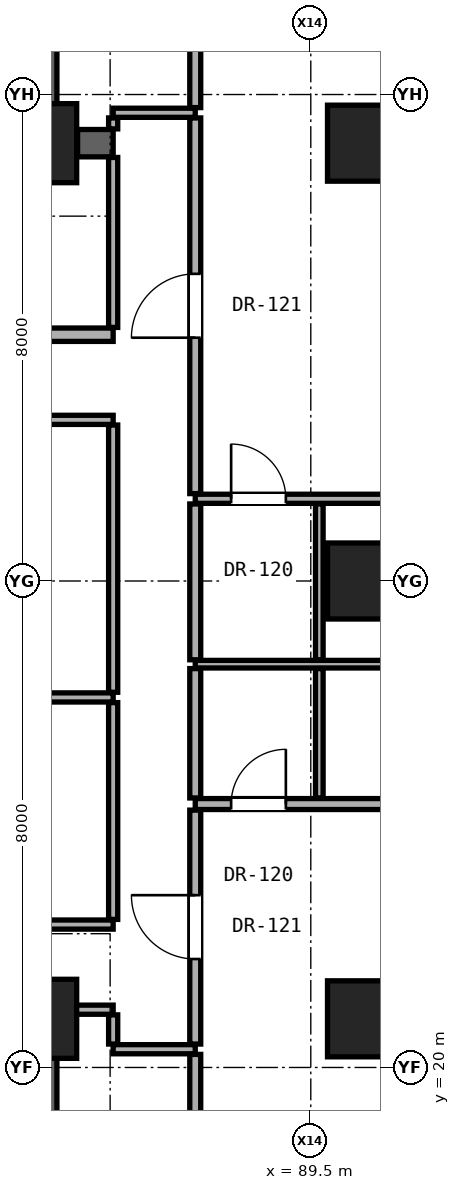
"""IFC4 building model, lengths in metres.
Left out: names, types, materials, properties, quantities, classifications, styles, units other than length and angle.
Written with IfcOpenShell. Run it as: python <this file> out.ifc"""

import sys

from ifc_helpers import new_model, si_unit, direction, frame, frame_2d, origin, origin_2d, place, context, subcontext, project, spatial, rectangle, hollow_rectangle, extrude, element, fill, save


model = new_model("IFC4")
c1 = context("Model", 3, precision=1e-05, world=origin(), true_north=direction((0.0, 1.0)))
c2 = subcontext(c1, "Body", "Model", "MODEL_VIEW")
j1 = project(units=[si_unit("LENGTHUNIT", "METRE"), si_unit("PLANEANGLEUNIT", "RADIAN")], contexts=[c1])
p1 = place(None, origin())
s1 = spatial("IfcSite", under=j1, at=p1, CompositionType="ELEMENT")
p2 = place(p1, origin())
s2 = spatial("IfcBuilding", under=s1, at=p2, CompositionType="ELEMENT")
p3 = place(p2, frame((0.0, 0.0, 71.9)))
s3 = spatial("IfcBuildingStorey", under=s2, at=p3, CompositionType="ELEMENT", Elevation=71.9)
for number, where, z_axis, x_axis in (
    (1, (85.0, 20.8, 0.0), (0.0, 0.0, 1.0), (1.0, 0.0, 0.0)),
    (2, (85.0, 35.2, 0.0), (0.0, 0.0, 1.0), (1.0, 0.0, 0.0)),
):
    element("IfcColumn", number, at=place(p3, frame(where, z_axis=z_axis, x_axis=x_axis)), inside=s3, PredefinedType="COLUMN", context=c2, shape_type="SweptSolid", body=[
        extrude(rectangle(XDim=1.3, YDim=1.3, at=origin_2d()), origin(), (0.0, 0.0, 1.0), 3.3),
    ])
for number, where, z_axis, x_axis in (
    (3, (90.4, 20.8, 0.0), (0.0, 0.0, 1.0), (1.0, 0.0, 0.0)),
    (4, (90.4, 28.0, 0.0), (0.0, 0.0, 1.0), (1.0, 0.0, 0.0)),
    (5, (90.4, 35.2, 0.0), (0.0, 0.0, 1.0), (1.0, 0.0, 0.0)),
):
    element("IfcColumn", number, at=place(p3, frame(where, z_axis=z_axis, x_axis=x_axis)), inside=s3, PredefinedType="COLUMN", context=c2, shape_type="SweptSolid", body=[
        extrude(hollow_rectangle(XDim=1.25, YDim=1.25, WallThickness=0.07, at=origin_2d()), origin(), (0.0, 0.0, 1.0), 3.3),
    ])
for number, where, z_axis, x_axis in (
    (6, (85.0, 35.2, 0.0), (0.0, 0.0, 1.0), (0.0, 1.0, 0.0)),
    (7, (85.0, 15.2, 0.0), (0.0, 0.0, 1.0), (0.0, 1.0, 0.0)),
):
    element("IfcWall", number, at=place(p3, frame(where, z_axis=z_axis, x_axis=x_axis)), inside=s3, PredefinedType="SHEAR", context=c2, shape_type="SweptSolid", body=[
        extrude(rectangle(XDim=5.6, YDim=0.65, at=frame_2d((2.8, 0.0))), origin(), (0.0, 0.0, 1.0), 3.06),
    ])
p4 = place(p3, frame((86.25, 20.3, 0.0), z_axis=(0.0, 0.0, 1.0), x_axis=(1.0, 0.0, 0.0)))
e8 = element("IfcWall", 8, at=p4, inside=s3, PredefinedType="PARTITIONING", context=c2, shape_type="SweptSolid", body=[
    extrude(rectangle(XDim=1.35, YDim=0.15, at=frame_2d((0.675, 0.0))), origin(), (0.0, 0.0, 1.0), 3.06),
])
p5 = place(p3, frame((85.32, 20.95, 0.0), z_axis=(0.0, 0.0, 1.0), x_axis=(1.0, 0.0, 0.0)))
e9 = element("IfcWall", 9, at=p5, inside=s3, PredefinedType="PARTITIONING", context=c2, shape_type="SweptSolid", body=[
    extrude(rectangle(XDim=0.93, YDim=0.15, at=frame_2d((0.465, 0.0))), origin(), (0.0, 0.0, 1.0), 2.452),
])
p6 = place(p3, frame((66.62, 22.35, 0.0), z_axis=(0.0, 0.0, 1.0), x_axis=(1.0, 0.0, 0.0)))
e10 = element("IfcWall", 10, at=p6, inside=s3, PredefinedType="PARTITIONING", context=c2, shape_type="SweptSolid", body=[
    extrude(rectangle(XDim=19.63, YDim=0.15, at=frame_2d((9.815, 0.0))), origin(), (0.0, 0.0, 1.0), 2.125),
])
p7 = place(p6, frame((8.981, 0.0, 0.0)))
e11 = element("IfcOpeningElement", 11, at=p7, cuts=e10, PredefinedType="OPENING", context=c2, shape_type="SweptSolid", body=[
    extrude(rectangle(XDim=0.85, YDim=2.01, at=frame_2d((0.425, 1.005))), frame((0.0, 0.085, 0.0), z_axis=(0.0, -1.0, 0.0), x_axis=(1.0, 0.0, 0.0)), (0.0, 0.0, 1.0), 0.17),
])
p8 = place(p6, frame((16.061, 0.0, 0.0)))
e12 = element("IfcOpeningElement", 12, at=p8, cuts=e10, PredefinedType="OPENING", context=c2, shape_type="SweptSolid", body=[
    extrude(rectangle(XDim=0.85, YDim=2.01, at=frame_2d((0.425, 1.005))), frame((0.0, 0.085, 0.0), z_axis=(0.0, -1.0, 0.0), x_axis=(1.0, 0.0, 0.0)), (0.0, 0.0, 1.0), 0.17),
])
p9 = place(p3, frame((87.6, 24.332, 0.0), z_axis=(0.0, 0.0, 1.0), x_axis=(1.0, 0.0, 0.0)))
e13 = element("IfcWall", 13, at=p9, inside=s3, PredefinedType="PARTITIONING", context=c2, shape_type="SweptSolid", body=[
    extrude(rectangle(XDim=7.768, YDim=0.18, at=frame_2d((3.884, 0.0))), origin(), (0.0, 0.0, 1.0), 2.196),
])
p10 = place(p9, frame((4.409, 0.0, 0.0)))
e14 = element("IfcOpeningElement", 14, at=p10, cuts=e13, PredefinedType="OPENING", context=c2, shape_type="SweptSolid", body=[
    extrude(rectangle(XDim=0.95, YDim=2.15, at=frame_2d((0.475, 1.075))), frame((0.0, 0.1, 0.0), z_axis=(0.0, -1.0, 0.0), x_axis=(1.0, 0.0, 0.0)), (0.0, 0.0, 1.0), 0.2),
])
p11 = place(p9, frame((0.59, 0.0, 0.0)))
e15 = element("IfcOpeningElement", 15, at=p11, cuts=e13, PredefinedType="OPENING", context=c2, shape_type="SweptSolid", body=[
    extrude(rectangle(XDim=0.9, YDim=2.1, at=frame_2d((0.45, 1.05))), frame((0.0, 0.1, 0.0), z_axis=(0.0, -1.0, 0.0), x_axis=(1.0, 0.0, 0.0)), (0.0, 0.0, 1.0), 0.2),
])
p12 = place(p3, frame((72.05, 26.085, 0.0), z_axis=(0.0, 0.0, 1.0), x_axis=(1.0, 0.0, 0.0)))
e16 = element("IfcWall", 16, at=p12, inside=s3, PredefinedType="PARTITIONING", context=c2, shape_type="SweptSolid", body=[
    extrude(rectangle(XDim=14.2, YDim=0.15, at=frame_2d((7.1, 0.0))), origin(), (0.0, 0.0, 1.0), 2.125),
])
p13 = place(p3, frame((87.6, 26.632, 0.0), z_axis=(0.0, 0.0, 1.0), x_axis=(1.0, 0.0, 0.0)))
e17 = element("IfcWall", 17, at=p13, inside=s3, PredefinedType="PARTITIONING", context=c2, shape_type="SweptSolid", body=[
    extrude(rectangle(XDim=7.768, YDim=0.125, at=frame_2d((3.884, 0.0))), origin(), (0.0, 0.0, 1.0), 2.196),
])
p14 = place(p3, frame((87.6, 29.352, 0.0), z_axis=(0.0, 0.0, 1.0), x_axis=(1.0, 0.0, 0.0)))
e18 = element("IfcWall", 18, at=p14, inside=s3, PredefinedType="PARTITIONING", context=c2, shape_type="SweptSolid", body=[
    extrude(rectangle(XDim=7.768, YDim=0.15, at=frame_2d((3.884, 0.0))), origin(), (0.0, 0.0, 1.0), 2.196),
])
p15 = place(p14, frame((4.409, 0.0, 0.0)))
e19 = element("IfcOpeningElement", 19, at=p15, cuts=e18, PredefinedType="OPENING", context=c2, shape_type="SweptSolid", body=[
    extrude(rectangle(XDim=0.95, YDim=2.15, at=frame_2d((0.475, 1.075))), frame((0.0, 0.085, 0.0), z_axis=(0.0, -1.0, 0.0), x_axis=(1.0, 0.0, 0.0)), (0.0, 0.0, 1.0), 0.17),
])
p16 = place(p14, frame((0.59, 0.0, 0.0)))
e20 = element("IfcOpeningElement", 20, at=p16, cuts=e18, PredefinedType="OPENING", context=c2, shape_type="SweptSolid", body=[
    extrude(rectangle(XDim=0.9, YDim=2.1, at=frame_2d((0.45, 1.05))), frame((0.0, 0.085, 0.0), z_axis=(0.0, -1.0, 0.0), x_axis=(1.0, 0.0, 0.0)), (0.0, 0.0, 1.0), 0.17),
])
p17 = place(p3, frame((66.62, 30.65, 0.0), z_axis=(0.0, 0.0, 1.0), x_axis=(1.0, 0.0, 0.0)))
e21 = element("IfcWall", 21, at=p17, inside=s3, PredefinedType="PARTITIONING", context=c2, shape_type="SweptSolid", body=[
    extrude(rectangle(XDim=19.63, YDim=0.15, at=frame_2d((9.815, 0.0))), origin(), (0.0, 0.0, 1.0), 2.125),
])
p18 = place(p17, frame((3.855, 0.0, 0.0)))
e22 = element("IfcOpeningElement", 22, at=p18, cuts=e21, PredefinedType="OPENING", context=c2, shape_type="SweptSolid", body=[
    extrude(rectangle(XDim=0.85, YDim=2.01, at=frame_2d((0.425, 1.005))), frame((0.0, 0.085, 0.0), z_axis=(0.0, -1.0, 0.0), x_axis=(1.0, 0.0, 0.0)), (0.0, 0.0, 1.0), 0.17),
])
p19 = place(p17, frame((8.981, 0.0, 0.0)))
e23 = element("IfcOpeningElement", 23, at=p19, cuts=e21, PredefinedType="OPENING", context=c2, shape_type="SweptSolid", body=[
    extrude(rectangle(XDim=0.85, YDim=2.01, at=frame_2d((0.425, 1.005))), frame((0.0, 0.085, 0.0), z_axis=(0.0, -1.0, 0.0), x_axis=(1.0, 0.0, 0.0)), (0.0, 0.0, 1.0), 0.17),
])
p20 = place(p17, frame((16.061, 0.0, 0.0)))
e24 = element("IfcOpeningElement", 24, at=p20, cuts=e21, PredefinedType="OPENING", context=c2, shape_type="SweptSolid", body=[
    extrude(rectangle(XDim=0.85, YDim=2.01, at=frame_2d((0.425, 1.005))), frame((0.0, 0.085, 0.0), z_axis=(0.0, -1.0, 0.0), x_axis=(1.0, 0.0, 0.0)), (0.0, 0.0, 1.0), 0.17),
])
p21 = place(p3, frame((71.55, 32.05, 0.0), z_axis=(0.0, 0.0, 1.0), x_axis=(1.0, 0.0, 0.0)))
e25 = element("IfcWall", 25, at=p21, inside=s3, PredefinedType="SOLIDWALL", context=c2, shape_type="SweptSolid", body=[
    extrude(rectangle(XDim=14.7, YDim=0.22, at=frame_2d((7.35, 0.0))), origin(), (0.0, 0.0, 1.0), 2.125),
])
p22 = place(p21, frame((11.39, 0.0, 0.0)))
e26 = element("IfcOpeningElement", 26, at=p22, cuts=e25, PredefinedType="OPENING", context=c2, shape_type="SweptSolid", body=[
    extrude(rectangle(XDim=0.85, YDim=2.01, at=frame_2d((0.425, 1.005))), frame((0.0, 0.12, 0.0), z_axis=(0.0, -1.0, 0.0), x_axis=(1.0, 0.0, 0.0)), (0.0, 0.0, 1.0), 0.24),
])
p23 = place(p21, frame((6.065, 0.0, 0.0)))
e27 = element("IfcOpeningElement", 27, at=p23, cuts=e25, PredefinedType="OPENING", context=c2, shape_type="SweptSolid", body=[
    extrude(rectangle(XDim=0.85, YDim=2.01, at=frame_2d((0.425, 1.005))), frame((0.0, 0.12, 0.0), z_axis=(0.0, -1.0, 0.0), x_axis=(1.0, 0.0, 0.0)), (0.0, 0.0, 1.0), 0.24),
])
p24 = place(p21, frame((0.7, 0.0, 0.0)))
e28 = element("IfcOpeningElement", 28, at=p24, cuts=e25, PredefinedType="OPENING", context=c2, shape_type="SweptSolid", body=[
    extrude(rectangle(XDim=0.85, YDim=2.01, at=frame_2d((0.425, 1.005))), frame((0.0, 0.12, 0.0), z_axis=(0.0, -1.0, 0.0), x_axis=(1.0, 0.0, 0.0)), (0.0, 0.0, 1.0), 0.24),
])
p25 = place(p21, frame((2.55, 0.0, 0.0)))
e29 = element("IfcOpeningElement", 29, at=p25, cuts=e25, PredefinedType="OPENING", context=c2, shape_type="SweptSolid", body=[
    extrude(rectangle(XDim=0.85, YDim=2.01, at=frame_2d((0.425, 1.005))), frame((0.0, 0.12, 0.0), z_axis=(0.0, -1.0, 0.0), x_axis=(1.0, 0.0, 0.0)), (0.0, 0.0, 1.0), 0.24),
])
p26 = place(p3, frame((85.665, 35.2, 0.0), z_axis=(0.0, 0.0, 1.0), x_axis=(1.0, 0.0, 0.0)))
e30 = element("IfcWall", 30, at=p26, inside=s3, PredefinedType="SHEAR", context=c2, shape_type="SweptSolid", body=[
    extrude(rectangle(XDim=0.585, YDim=0.45, at=frame_2d((0.292, 0.0))), origin(), (0.0, 0.0, 1.0), 3.06),
])
p27 = place(p3, frame((86.25, 35.7, 0.0), z_axis=(0.0, 0.0, 1.0), x_axis=(1.0, 0.0, 0.0)))
e31 = element("IfcWall", 31, at=p27, inside=s3, PredefinedType="PARTITIONING", context=c2, shape_type="SweptSolid", body=[
    extrude(rectangle(XDim=1.35, YDim=0.15, at=frame_2d((0.675, 0.0))), origin(), (0.0, 0.0, 1.0), 3.06),
])
p28 = place(p3, frame((86.25, 20.385, 0.0), z_axis=(0.0, 0.0, 1.0), x_axis=(0.0, 1.0, 0.0)))
e32 = element("IfcWall", 32, at=p28, inside=s3, PredefinedType="PARTITIONING", context=c2, shape_type="SweptSolid", body=[
    extrude(rectangle(XDim=0.48, YDim=0.15, at=frame_2d((0.24, 0.0))), origin(), (0.0, 0.0, 1.0), 2.452),
])
p29 = place(p3, frame((86.25, 22.435, 0.0), z_axis=(0.0, 0.0, 1.0), x_axis=(0.0, 1.0, 0.0)))
e33 = element("IfcWall", 33, at=p29, inside=s3, PredefinedType="PARTITIONING", context=c2, shape_type="SweptSolid", body=[
    extrude(rectangle(XDim=3.565, YDim=0.15, at=frame_2d((1.782, 0.0))), origin(), (0.0, 0.0, 1.0), 3.06),
])
p30 = place(p3, frame((86.25, 26.17, 0.0), z_axis=(0.0, 0.0, 1.0), x_axis=(0.0, 1.0, 0.0)))
e34 = element("IfcWall", 34, at=p30, inside=s3, PredefinedType="PARTITIONING", context=c2, shape_type="SweptSolid", body=[
    extrude(rectangle(XDim=4.395, YDim=0.15, at=frame_2d((2.198, 0.0))), origin(), (0.0, 0.0, 1.0), 2.279),
])
p31 = place(p3, frame((86.25, 32.17, 0.0), z_axis=(0.0, 0.0, 1.0), x_axis=(0.0, 1.0, 0.0)))
e35 = element("IfcWall", 35, at=p31, inside=s3, PredefinedType="PARTITIONING", context=c2, shape_type="SweptSolid", body=[
    extrude(rectangle(XDim=2.795, YDim=0.15, at=frame_2d((1.397, 0.0))), origin(), (0.0, 0.0, 1.0), 2.452),
])
p32 = place(p3, frame((86.25, 35.435, 0.0), z_axis=(0.0, 0.0, 1.0), x_axis=(0.0, 1.0, 0.0)))
e36 = element("IfcWall", 36, at=p32, inside=s3, PredefinedType="PARTITIONING", context=c2, shape_type="SweptSolid", body=[
    extrude(rectangle(XDim=0.18, YDim=0.15, at=frame_2d((0.09, 0.0))), origin(), (0.0, 0.0, 1.0), 2.452),
])
p33 = place(p3, frame((87.6, 16.37, 0.0), z_axis=(0.0, 0.0, 1.0), x_axis=(0.0, 1.0, 0.0)))
e37 = element("IfcWall", 37, at=p33, inside=s3, PredefinedType="PARTITIONING", context=c2, shape_type="SweptSolid", body=[
    extrude(rectangle(XDim=3.845, YDim=0.18, at=frame_2d((1.922, 0.0))), origin(), (0.0, 0.0, 1.0), 2.436),
])
p34 = place(p3, frame((87.6, 20.385, 0.0), z_axis=(0.0, 0.0, 1.0), x_axis=(0.0, 1.0, 0.0)))
e38 = element("IfcWall", 38, at=p34, inside=s3, PredefinedType="PARTITIONING", context=c2, shape_type="SweptSolid", body=[
    extrude(rectangle(XDim=3.847, YDim=0.18, at=frame_2d((1.923, 0.0))), origin(), (0.0, 0.0, 1.0), 2.452),
])
p35 = place(p34, frame((1.398, 0.0, 0.0)))
e39 = element("IfcOpeningElement", 39, at=p35, cuts=e38, PredefinedType="OPENING", context=c2, shape_type="SweptSolid", body=[
    extrude(rectangle(XDim=1.05, YDim=2.2, at=frame_2d((0.525, 1.1))), frame((0.0, 0.1, 0.0), z_axis=(0.0, -1.0, 0.0), x_axis=(1.0, 0.0, 0.0)), (0.0, 0.0, 1.0), 0.2),
])
p36 = place(p3, frame((87.6, 24.432, 0.0), z_axis=(0.0, 0.0, 1.0), x_axis=(0.0, 1.0, 0.0)))
e40 = element("IfcWall", 40, at=p36, inside=s3, PredefinedType="PARTITIONING", context=c2, shape_type="SweptSolid", body=[
    extrude(rectangle(XDim=2.128, YDim=0.18, at=frame_2d((1.064, 0.0))), origin(), (0.0, 0.0, 1.0), 3.06),
])
p37 = place(p3, frame((87.6, 26.705, 0.0), z_axis=(0.0, 0.0, 1.0), x_axis=(0.0, 1.0, 0.0)))
e41 = element("IfcWall", 41, at=p37, inside=s3, PredefinedType="PARTITIONING", context=c2, shape_type="SweptSolid", body=[
    extrude(rectangle(XDim=2.562, YDim=0.18, at=frame_2d((1.281, 0.0))), origin(), (0.0, 0.0, 1.0), 2.279),
])
p38 = place(p3, frame((87.6, 29.437, 0.0), z_axis=(0.0, 0.0, 1.0), x_axis=(0.0, 1.0, 0.0)))
e42 = element("IfcWall", 42, at=p38, inside=s3, PredefinedType="PARTITIONING", context=c2, shape_type="SweptSolid", body=[
    extrude(rectangle(XDim=6.178, YDim=0.18, at=frame_2d((3.089, 0.0))), origin(), (0.0, 0.0, 1.0), 2.452),
])
p39 = place(p38, frame((2.564, 0.0, 0.0)))
e43 = element("IfcOpeningElement", 43, at=p39, cuts=e42, PredefinedType="OPENING", context=c2, shape_type="SweptSolid", body=[
    extrude(rectangle(XDim=1.05, YDim=2.2, at=frame_2d((0.525, 1.1))), frame((0.0, 0.1, 0.0), z_axis=(0.0, -1.0, 0.0), x_axis=(1.0, 0.0, 0.0)), (0.0, 0.0, 1.0), 0.2),
])
p40 = place(p3, frame((87.6, 35.785, 0.0), z_axis=(0.0, 0.0, 1.0), x_axis=(0.0, 1.0, 0.0)))
e44 = element("IfcWall", 44, at=p40, inside=s3, PredefinedType="PARTITIONING", context=c2, shape_type="SweptSolid", body=[
    extrude(rectangle(XDim=3.86, YDim=0.18, at=frame_2d((1.93, 0.0))), origin(), (0.0, 0.0, 1.0), 2.436),
])
p41 = place(p3, frame((89.64, 24.432, 0.0), z_axis=(0.0, 0.0, 1.0), x_axis=(0.0, 1.0, 0.0)))
e45 = element("IfcWall", 45, at=p41, inside=s3, PredefinedType="PARTITIONING", context=c2, shape_type="SweptSolid", body=[
    extrude(rectangle(XDim=2.128, YDim=0.125, at=frame_2d((1.064, 0.0))), origin(), (0.0, 0.0, 1.0), 3.06),
])
p42 = place(p3, frame((89.64, 26.705, 0.0), z_axis=(0.0, 0.0, 1.0), x_axis=(0.0, 1.0, 0.0)))
e46 = element("IfcWall", 46, at=p42, inside=s3, PredefinedType="PARTITIONING", context=c2, shape_type="SweptSolid", body=[
    extrude(rectangle(XDim=2.562, YDim=0.125, at=frame_2d((1.281, 0.0))), origin(), (0.0, 0.0, 1.0), 2.279),
])
p43 = place(p35, origin())
e47 = element("IfcDoor", 47, at=p43, inside=s3, OperationType="SINGLE_SWING_RIGHT", PredefinedType="DOOR", context=c2, shape_type="SweptSolid", body=[
    extrude(rectangle(XDim=1.05, YDim=2.2, at=frame_2d((0.525, 1.1))), frame((0.0, 0.025, 0.0), z_axis=(0.0, -1.0, 0.0), x_axis=(1.0, 0.0, 0.0)), (0.0, 0.0, 1.0), 0.05),
])
fill(e39, e47)
p44 = place(p11, origin())
e48 = element("IfcDoor", 48, at=p44, inside=s3, OperationType="SINGLE_SWING_RIGHT", PredefinedType="DOOR", context=c2, shape_type="SweptSolid", body=[
    extrude(rectangle(XDim=0.9, YDim=2.1, at=frame_2d((0.45, 1.05))), frame((0.0, 0.025, 0.0), z_axis=(0.0, -1.0, 0.0), x_axis=(1.0, 0.0, 0.0)), (0.0, 0.0, 1.0), 0.05),
])
fill(e15, e48)
p45 = place(p39, origin())
e49 = element("IfcDoor", 49, at=p45, inside=s3, OperationType="SINGLE_SWING_LEFT", PredefinedType="DOOR", context=c2, shape_type="SweptSolid", body=[
    extrude(rectangle(XDim=1.05, YDim=2.2, at=frame_2d((0.525, 1.1))), frame((0.0, 0.025, 0.0), z_axis=(0.0, -1.0, 0.0), x_axis=(1.0, 0.0, 0.0)), (0.0, 0.0, 1.0), 0.05),
])
fill(e43, e49)
p46 = place(p16, origin())
e50 = element("IfcDoor", 50, at=p46, inside=s3, OperationType="SINGLE_SWING_LEFT", PredefinedType="DOOR", context=c2, shape_type="SweptSolid", body=[
    extrude(rectangle(XDim=0.9, YDim=2.1, at=frame_2d((0.45, 1.05))), frame((0.0, 0.025, 0.0), z_axis=(0.0, -1.0, 0.0), x_axis=(1.0, 0.0, 0.0)), (0.0, 0.0, 1.0), 0.05),
])
fill(e20, e50)
save(model, sys.argv[1])
